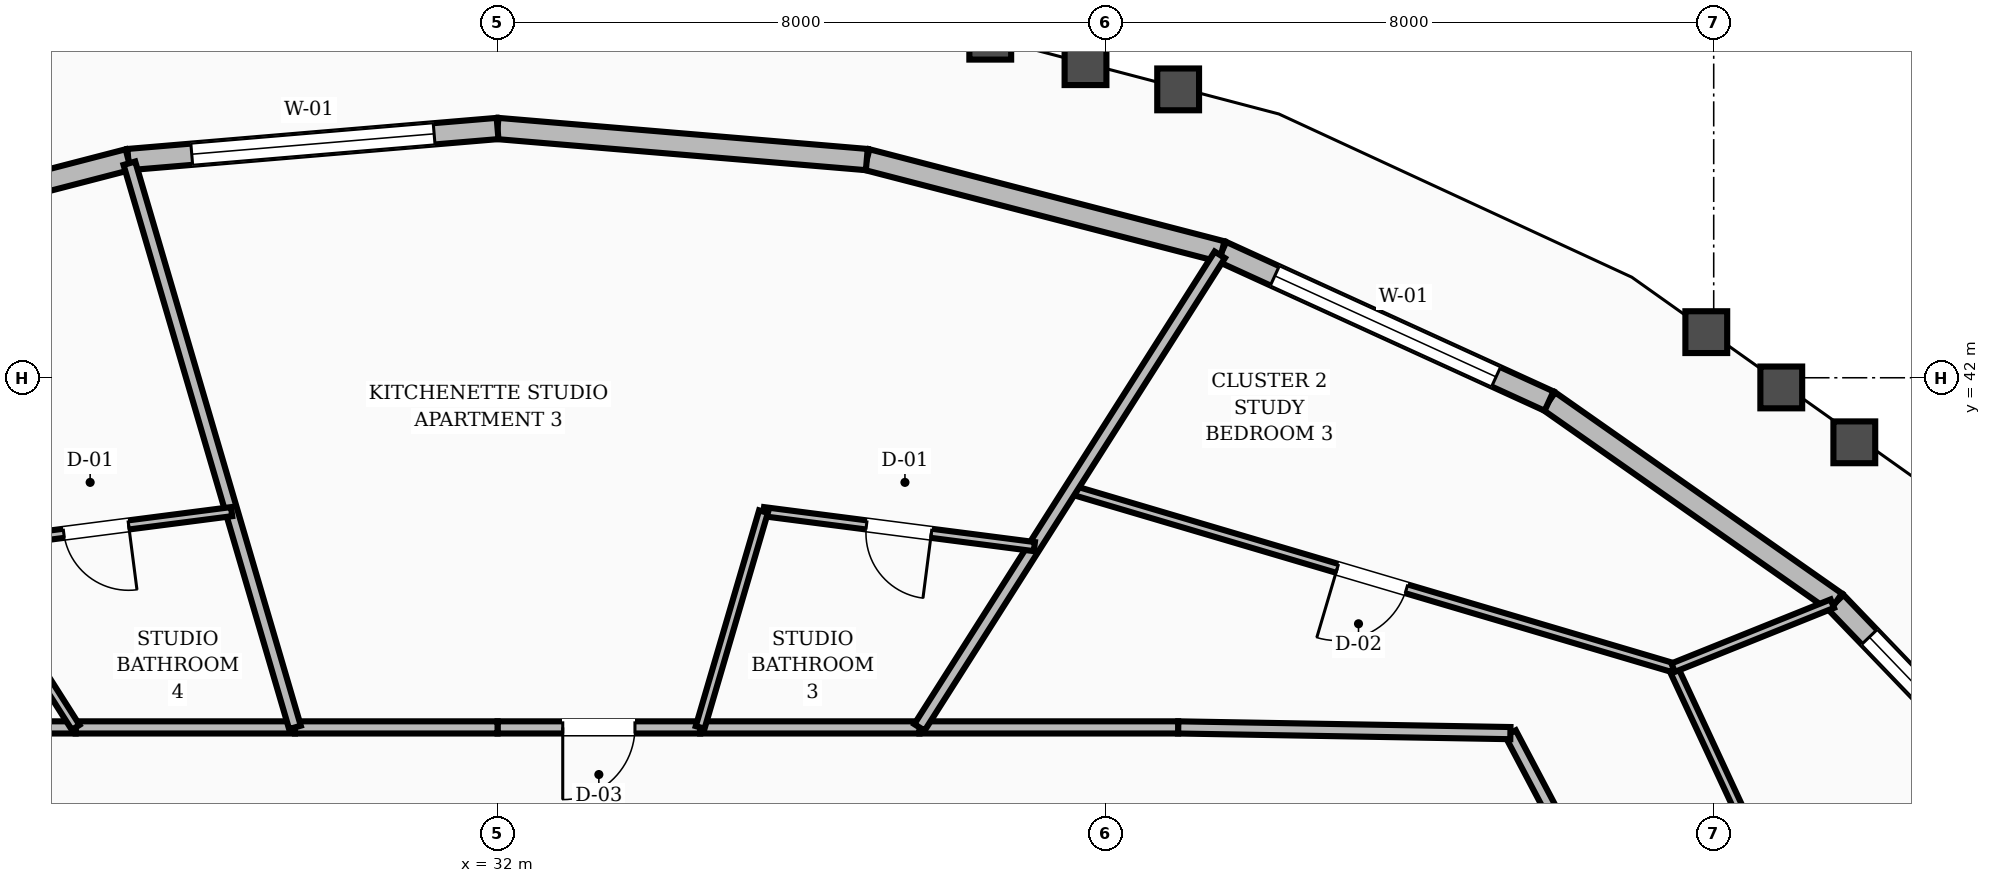
"""IFC4 building model, lengths in metres.
Left out: names, types, materials, properties, quantities, classifications, styles, units other than length and angle.
Written with IfcOpenShell. Run it as: python <this file> out.ifc"""

import sys

from ifc_helpers import new_model, si_unit, direction, frame, frame_2d, origin, place, context, subcontext, project, spatial, rectangle, extrude, element, fill, save


model = new_model("IFC4")
c1 = context("Model", 3, precision=1e-05, world=origin(), true_north=direction((0.0, 1.0)))
c2 = subcontext(c1, "Body", "Model", "MODEL_VIEW")
j1 = project(units=[si_unit("LENGTHUNIT", "METRE"), si_unit("PLANEANGLEUNIT", "RADIAN")], contexts=[c1])
p1 = place(None, origin())
s1 = spatial("IfcSite", under=j1, at=p1, CompositionType="ELEMENT")
p2 = place(p1, origin())
s2 = spatial("IfcBuilding", under=s1, at=p2, CompositionType="ELEMENT")
p3 = place(p2, frame((0.0, 0.0, 192.8)))
s3 = spatial("IfcBuildingStorey", under=s2, at=p3, CompositionType="ELEMENT", Elevation=192.8)
p4 = place(p3, frame((52.704, 35.822, 0.0), z_axis=(0.0, 0.0, 1.0), x_axis=(-0.692654585046, 0.721269454375, 0.0)))
e1 = element("IfcWall", 1, at=p4, inside=s3, PredefinedType="STANDARD", context=c2, shape_type="SweptSolid", body=[
    extrude(rectangle(XDim=4.471, YDim=0.28, at=frame_2d((2.235, 0.0))), origin(), (0.0, 0.0, 1.0), 2.82),
])
p5 = place(p4, frame((0.635, 0.0, 0.8)))
e2 = element("IfcOpeningElement", 2, at=p5, cuts=e1, PredefinedType="OPENING", context=c2, shape_type="SweptSolid", body=[
    extrude(rectangle(XDim=3.2, YDim=1.65, at=frame_2d((1.6, 0.825))), frame((0.0, 0.15, 0.0), z_axis=(0.0, -1.0, 0.0), x_axis=(1.0, 0.0, 0.0)), (0.0, 0.0, 1.0), 0.3),
])
p6 = place(p3, frame((49.607, 39.047, 0.0), z_axis=(0.0, 0.0, 1.0), x_axis=(-0.818721405334, 0.574190961657, 0.0)))
e3 = element("IfcWall", 3, at=p6, inside=s3, PredefinedType="STANDARD", context=c2, shape_type="SweptSolid", body=[
    extrude(rectangle(XDim=4.609, YDim=0.28, at=frame_2d((2.304, 0.0))), origin(), (0.0, 0.0, 1.0), 2.82),
])
p7 = place(p3, frame((45.834, 41.693, 0.0), z_axis=(0.0, 0.0, 1.0), x_axis=(-0.909587572303, 0.415512272155, 0.0)))
e4 = element("IfcWall", 4, at=p7, inside=s3, PredefinedType="STANDARD", context=c2, shape_type="SweptSolid", body=[
    extrude(rectangle(XDim=4.733, YDim=0.28, at=frame_2d((2.366, 0.0))), origin(), (0.0, 0.0, 1.0), 2.82),
])
p8 = place(p7, frame((0.766, 0.0, 0.8)))
e5 = element("IfcOpeningElement", 5, at=p8, cuts=e4, PredefinedType="OPENING", context=c2, shape_type="SweptSolid", body=[
    extrude(rectangle(XDim=3.2, YDim=1.65, at=frame_2d((1.6, 0.825))), frame((0.0, 0.15, 0.0), z_axis=(0.0, -1.0, 0.0), x_axis=(1.0, 0.0, 0.0)), (0.0, 0.0, 1.0), 0.3),
])
p9 = place(p3, frame((41.529, 43.66, 0.0), z_axis=(0.0, 0.0, 1.0), x_axis=(-0.968001905281, 0.250942844833, 0.0)))
e6 = element("IfcWall", 6, at=p9, inside=s3, PredefinedType="STANDARD", context=c2, shape_type="SweptSolid", body=[
    extrude(rectangle(XDim=4.825, YDim=0.28, at=frame_2d((2.413, 0.0))), origin(), (0.0, 0.0, 1.0), 2.82),
])
p10 = place(p3, frame((36.858, 44.871, 0.0), z_axis=(0.0, 0.0, 1.0), x_axis=(-0.996479473867, 0.083837092992, 0.0)))
e7 = element("IfcWall", 7, at=p10, inside=s3, PredefinedType="STANDARD", context=c2, shape_type="SweptSolid", body=[
    extrude(rectangle(XDim=4.875, YDim=0.28, at=frame_2d((2.438, 0.0))), origin(), (0.0, 0.0, 1.0), 2.82),
])
p11 = place(p3, frame((32.0, 45.279, 0.0), z_axis=(0.0, 0.0, 1.0), x_axis=(-0.996479473867, -0.083837092992, 0.0)))
e8 = element("IfcWall", 8, at=p11, inside=s3, PredefinedType="STANDARD", context=c2, shape_type="SweptSolid", body=[
    extrude(rectangle(XDim=4.875, YDim=0.28, at=frame_2d((2.438, 0.0))), origin(), (0.0, 0.0, 1.0), 2.82),
])
p12 = place(p11, frame((0.837, 0.0, 0.8)))
e9 = element("IfcOpeningElement", 9, at=p12, cuts=e8, PredefinedType="OPENING", context=c2, shape_type="SweptSolid", body=[
    extrude(rectangle(XDim=3.2, YDim=1.65, at=frame_2d((1.6, 0.825))), frame((0.0, 0.15, 0.0), z_axis=(0.0, -1.0, 0.0), x_axis=(1.0, 0.0, 0.0)), (0.0, 0.0, 1.0), 0.3),
])
p13 = place(p3, frame((27.142, 44.871, 0.0), z_axis=(0.0, 0.0, 1.0), x_axis=(-0.968001905281, -0.250942844833, 0.0)))
e10 = element("IfcWall", 10, at=p13, inside=s3, PredefinedType="STANDARD", context=c2, shape_type="SweptSolid", body=[
    extrude(rectangle(XDim=4.825, YDim=0.28, at=frame_2d((2.413, 0.0))), origin(), (0.0, 0.0, 1.0), 2.82),
])
p14 = place(p3, frame((47.05, 34.056, 0.0), z_axis=(0.0, 0.0, 1.0), x_axis=(-0.466737093093, 0.884396113702, 0.0)))
e11 = element("IfcWall", 11, at=p14, inside=s3, PredefinedType="SOLIDWALL", context=c2, shape_type="SweptSolid", body=[
    extrude(rectangle(XDim=3.696, YDim=0.16, at=frame_2d((1.848, 0.0))), origin(), (0.0, 0.0, 1.0), 2.8),
])
p15 = place(p3, frame((45.325, 37.325, 0.0), z_axis=(0.0, 0.0, 1.0), x_axis=(-0.999853038912, 0.017143528788, 0.0)))
e12 = element("IfcWall", 12, at=p15, inside=s3, PredefinedType="SOLIDWALL", context=c2, shape_type="SweptSolid", body=[
    extrude(rectangle(XDim=4.372, YDim=0.16, at=frame_2d((2.186, 0.0))), origin(), (0.0, 0.0, 1.0), 2.8),
])
p16 = place(p3, frame((40.954, 37.4, 0.0), z_axis=(0.0, 0.0, 1.0), x_axis=(-1.0, 0.0, 0.0)))
e13 = element("IfcWall", 13, at=p16, inside=s3, PredefinedType="SOLIDWALL", context=c2, shape_type="SweptSolid", body=[
    extrude(rectangle(XDim=3.403, YDim=0.16, at=frame_2d((1.702, 0.0))), origin(), (0.0, 0.0, 1.0), 2.8),
])
p17 = place(p3, frame((37.551, 37.4, 0.0), z_axis=(0.0, 0.0, 1.0), x_axis=(-1.0, 0.0, 0.0)))
e14 = element("IfcWall", 14, at=p17, inside=s3, PredefinedType="SOLIDWALL", context=c2, shape_type="SweptSolid", body=[
    extrude(rectangle(XDim=2.885, YDim=0.16, at=frame_2d((1.443, 0.0))), origin(), (0.0, 0.0, 1.0), 2.8),
])
p18 = place(p3, frame((34.665, 37.4, 0.0), z_axis=(0.0, 0.0, 1.0), x_axis=(-1.0, 0.0, 0.0)))
e15 = element("IfcWall", 15, at=p18, inside=s3, PredefinedType="SOLIDWALL", context=c2, shape_type="SweptSolid", body=[
    extrude(rectangle(XDim=2.665, YDim=0.16, at=frame_2d((1.333, 0.0))), origin(), (0.0, 0.0, 1.0), 2.8),
])
p19 = place(p18, frame((0.858, 0.0, 0.0)))
e16 = element("IfcOpeningElement", 16, at=p19, cuts=e15, PredefinedType="OPENING", context=c2, shape_type="SweptSolid", body=[
    extrude(rectangle(XDim=0.95, YDim=2.1, at=frame_2d((0.475, 1.05))), frame((0.0, 0.09, 0.0), z_axis=(0.0, -1.0, 0.0), x_axis=(1.0, 0.0, 0.0)), (0.0, 0.0, 1.0), 0.18),
])
p20 = place(p3, frame((32.0, 37.4, 0.0), z_axis=(0.0, 0.0, 1.0), x_axis=(-1.0, 0.0, 0.0)))
e17 = element("IfcWall", 17, at=p20, inside=s3, PredefinedType="SOLIDWALL", context=c2, shape_type="SweptSolid", body=[
    extrude(rectangle(XDim=2.665, YDim=0.16, at=frame_2d((1.333, 0.0))), origin(), (0.0, 0.0, 1.0), 2.8),
])
p21 = place(p3, frame((29.335, 37.4, 0.0), z_axis=(0.0, 0.0, 1.0), x_axis=(-1.0, 0.0, 0.0)))
e18 = element("IfcWall", 18, at=p21, inside=s3, PredefinedType="SOLIDWALL", context=c2, shape_type="SweptSolid", body=[
    extrude(rectangle(XDim=2.885, YDim=0.16, at=frame_2d((1.443, 0.0))), origin(), (0.0, 0.0, 1.0), 2.8),
])
p22 = place(p3, frame((26.449, 37.4, 0.0), z_axis=(0.0, 0.0, 1.0), x_axis=(-1.0, 0.0, 0.0)))
e19 = element("IfcWall", 19, at=p22, inside=s3, PredefinedType="SOLIDWALL", context=c2, shape_type="SweptSolid", body=[
    extrude(rectangle(XDim=3.403, YDim=0.16, at=frame_2d((1.702, 0.0))), origin(), (0.0, 0.0, 1.0), 2.8),
])
p23 = place(p22, frame((1.227, 0.0, 0.0)))
e20 = element("IfcOpeningElement", 20, at=p23, cuts=e19, PredefinedType="OPENING", context=c2, shape_type="SweptSolid", body=[
    extrude(rectangle(XDim=0.95, YDim=2.1, at=frame_2d((0.475, 1.05))), frame((0.0, 0.09, 0.0), z_axis=(0.0, -1.0, 0.0), x_axis=(1.0, 0.0, 0.0)), (0.0, 0.0, 1.0), 0.18),
])
p24 = place(p3, frame((50.769, 31.081, 0.0), z_axis=(0.0, 0.0, 1.0), x_axis=(-0.421528761088, 0.906815032725, 0.0)))
e21 = element("IfcWall", 21, at=p24, inside=s3, PredefinedType="PARTITIONING", context=c2, shape_type="SweptSolid", body=[
    extrude(rectangle(XDim=7.834, YDim=0.12, at=frame_2d((3.917, 0.0))), origin(), (0.0, 0.0, 1.0), 2.8),
])
p25 = place(p24, frame((3.442, 0.0, 0.0)))
e22 = element("IfcOpeningElement", 22, at=p25, cuts=e21, PredefinedType="OPENING", context=c2, shape_type="SweptSolid", body=[
    extrude(rectangle(XDim=0.95, YDim=2.1, at=frame_2d((0.475, 1.05))), frame((0.0, 0.07, 0.0), z_axis=(0.0, -1.0, 0.0), x_axis=(1.0, 0.0, 0.0)), (0.0, 0.0, 1.0), 0.14),
])
p26 = place(p3, frame((47.466, 38.186, 0.0), z_axis=(0.0, 0.0, 1.0), x_axis=(-0.958949642068, 0.283576416469, 0.0)))
e23 = element("IfcWall", 23, at=p26, inside=s3, PredefinedType="PARTITIONING", context=c2, shape_type="SweptSolid", body=[
    extrude(rectangle(XDim=8.266, YDim=0.12, at=frame_2d((4.133, 0.0))), origin(), (0.0, 0.0, 1.0), 2.8),
])
p27 = place(p26, frame((3.658, 0.0, 0.0)))
e24 = element("IfcOpeningElement", 24, at=p27, cuts=e23, PredefinedType="OPENING", context=c2, shape_type="SweptSolid", body=[
    extrude(rectangle(XDim=0.95, YDim=2.1, at=frame_2d((0.475, 1.05))), frame((0.0, 0.07, 0.0), z_axis=(0.0, -1.0, 0.0), x_axis=(1.0, 0.0, 0.0)), (0.0, 0.0, 1.0), 0.14),
])
p28 = place(p3, frame((47.466, 38.186, 0.0), z_axis=(0.0, 0.0, 1.0), x_axis=(0.927788935217, 0.373105469926, 0.0)))
e25 = element("IfcWall", 25, at=p28, inside=s3, PredefinedType="PARTITIONING", context=c2, shape_type="SweptSolid", body=[
    extrude(rectangle(XDim=2.258, YDim=0.12, at=frame_2d((1.129, 0.0))), origin(), (0.0, 0.0, 1.0), 2.8),
])
p29 = place(p3, frame((37.551, 37.4, 0.0), z_axis=(0.0, 0.0, 1.0), x_axis=(0.536373616105, 0.843980653775, 0.0)))
e26 = element("IfcWall", 26, at=p29, inside=s3, PredefinedType="SOLIDWALL", context=c2, shape_type="SweptSolid", body=[
    extrude(rectangle(XDim=7.367, YDim=0.16, at=frame_2d((3.684, 0.0))), origin(), (0.0, 0.0, 1.0), 2.8),
])
p30 = place(p3, frame((39.062, 39.779, 0.0), z_axis=(0.0, 0.0, 1.0), x_axis=(-0.991764787462, 0.128072660435, 0.0)))
e27 = element("IfcWall", 27, at=p30, inside=s3, PredefinedType="PARTITIONING", context=c2, shape_type="SweptSolid", body=[
    extrude(rectangle(XDim=3.593, YDim=0.12, at=frame_2d((1.797, 0.0))), origin(), (0.0, 0.0, 1.0), 2.8),
])
p31 = place(p30, frame((1.367, 0.0, 0.0)))
e28 = element("IfcOpeningElement", 28, at=p31, cuts=e27, PredefinedType="OPENING", context=c2, shape_type="SweptSolid", body=[
    extrude(rectangle(XDim=0.86, YDim=2.1, at=frame_2d((0.43, 1.05))), frame((0.0, 0.07, 0.0), z_axis=(0.0, -1.0, 0.0), x_axis=(1.0, 0.0, 0.0)), (0.0, 0.0, 1.0), 0.14),
])
p32 = place(p3, frame((34.665, 37.4, 0.0), z_axis=(0.0, 0.0, 1.0), x_axis=(0.28163464266, 0.959521718386, 0.0)))
e29 = element("IfcWall", 29, at=p32, inside=s3, PredefinedType="PARTITIONING", context=c2, shape_type="SweptSolid", body=[
    extrude(rectangle(XDim=2.959, YDim=0.12, at=frame_2d((1.479, 0.0))), origin(), (0.0, 0.0, 1.0), 2.8),
])
p33 = place(p3, frame((29.335, 37.4, 0.0), z_axis=(0.0, 0.0, 1.0), x_axis=(-0.281583607125, 0.95953669664, 0.0)))
e30 = element("IfcWall", 30, at=p33, inside=s3, PredefinedType="SOLIDWALL", context=c2, shape_type="SweptSolid", body=[
    extrude(rectangle(XDim=7.736, YDim=0.16, at=frame_2d((3.868, 0.0))), origin(), (0.0, 0.0, 1.0), 2.8),
])
p34 = place(p3, frame((28.501, 40.239, 0.0), z_axis=(0.0, 0.0, 1.0), x_axis=(-0.991764787462, -0.128072660435, 0.0)))
e31 = element("IfcWall", 31, at=p34, inside=s3, PredefinedType="PARTITIONING", context=c2, shape_type="SweptSolid", body=[
    extrude(rectangle(XDim=3.593, YDim=0.12, at=frame_2d((1.797, 0.0))), origin(), (0.0, 0.0, 1.0), 2.8),
])
p35 = place(p34, frame((1.367, 0.0, 0.0)))
e32 = element("IfcOpeningElement", 32, at=p35, cuts=e31, PredefinedType="OPENING", context=c2, shape_type="SweptSolid", body=[
    extrude(rectangle(XDim=0.86, YDim=2.1, at=frame_2d((0.43, 1.05))), frame((0.0, 0.07, 0.0), z_axis=(0.0, -1.0, 0.0), x_axis=(1.0, 0.0, 0.0)), (0.0, 0.0, 1.0), 0.14),
])
p36 = place(p3, frame((26.449, 37.4, 0.0), z_axis=(0.0, 0.0, 1.0), x_axis=(-0.536376545324, 0.843978792166, 0.0)))
e33 = element("IfcWall", 33, at=p36, inside=s3, PredefinedType="PARTITIONING", context=c2, shape_type="SweptSolid", body=[
    extrude(rectangle(XDim=2.818, YDim=0.12, at=frame_2d((1.409, 0.0))), origin(), (0.0, 0.0, 1.0), 2.8),
])
p37 = place(p5, origin())
e34 = element("IfcWindow", 34, at=p37, inside=s3, PartitioningType="SINGLE_PANEL", PredefinedType="WINDOW", context=c2, shape_type="SweptSolid", body=[
    extrude(rectangle(XDim=3.2, YDim=1.65, at=frame_2d((1.6, 0.825))), frame((0.0, 0.03, 0.0), z_axis=(0.0, -1.0, 0.0), x_axis=(1.0, 0.0, 0.0)), (0.0, 0.0, 1.0), 0.06),
])
fill(e2, e34)
p38 = place(p8, origin())
e35 = element("IfcWindow", 35, at=p38, inside=s3, PartitioningType="SINGLE_PANEL", PredefinedType="WINDOW", context=c2, shape_type="SweptSolid", body=[
    extrude(rectangle(XDim=3.2, YDim=1.65, at=frame_2d((1.6, 0.825))), frame((0.0, 0.03, 0.0), z_axis=(0.0, -1.0, 0.0), x_axis=(1.0, 0.0, 0.0)), (0.0, 0.0, 1.0), 0.06),
])
fill(e5, e35)
p39 = place(p12, origin())
e36 = element("IfcWindow", 36, at=p39, inside=s3, PartitioningType="SINGLE_PANEL", PredefinedType="WINDOW", context=c2, shape_type="SweptSolid", body=[
    extrude(rectangle(XDim=3.2, YDim=1.65, at=frame_2d((1.6, 0.825))), frame((0.0, 0.03, 0.0), z_axis=(0.0, -1.0, 0.0), x_axis=(1.0, 0.0, 0.0)), (0.0, 0.0, 1.0), 0.06),
])
fill(e9, e36)
p40 = place(p27, origin())
e37 = element("IfcDoor", 37, at=p40, inside=s3, OperationType="SINGLE_SWING_RIGHT", PredefinedType="DOOR", context=c2, shape_type="SweptSolid", body=[
    extrude(rectangle(XDim=0.95, YDim=2.1, at=frame_2d((0.475, 1.05))), frame((0.0, 0.025, 0.0), z_axis=(0.0, -1.0, 0.0), x_axis=(1.0, 0.0, 0.0)), (0.0, 0.0, 1.0), 0.05),
])
fill(e24, e37)
p41 = place(p31, origin())
e38 = element("IfcDoor", 38, at=p41, inside=s3, OperationType="SINGLE_SWING_LEFT", PredefinedType="DOOR", context=c2, shape_type="SweptSolid", body=[
    extrude(rectangle(XDim=0.86, YDim=2.1, at=frame_2d((0.43, 1.05))), frame((0.0, 0.025, 0.0), z_axis=(0.0, -1.0, 0.0), x_axis=(1.0, 0.0, 0.0)), (0.0, 0.0, 1.0), 0.05),
])
fill(e28, e38)
p42 = place(p19, origin())
e39 = element("IfcDoor", 39, at=p42, inside=s3, OperationType="SINGLE_SWING_RIGHT", PredefinedType="DOOR", context=c2, shape_type="SweptSolid", body=[
    extrude(rectangle(XDim=0.95, YDim=2.1, at=frame_2d((0.475, 1.05))), frame((0.0, 0.025, 0.0), z_axis=(0.0, -1.0, 0.0), x_axis=(1.0, 0.0, 0.0)), (0.0, 0.0, 1.0), 0.05),
])
fill(e16, e39)
p43 = place(p35, origin())
e40 = element("IfcDoor", 40, at=p43, inside=s3, OperationType="SINGLE_SWING_LEFT", PredefinedType="DOOR", context=c2, shape_type="SweptSolid", body=[
    extrude(rectangle(XDim=0.86, YDim=2.1, at=frame_2d((0.43, 1.05))), frame((0.0, 0.025, 0.0), z_axis=(0.0, -1.0, 0.0), x_axis=(1.0, 0.0, 0.0)), (0.0, 0.0, 1.0), 0.05),
])
fill(e32, e40)
save(model, sys.argv[1])
